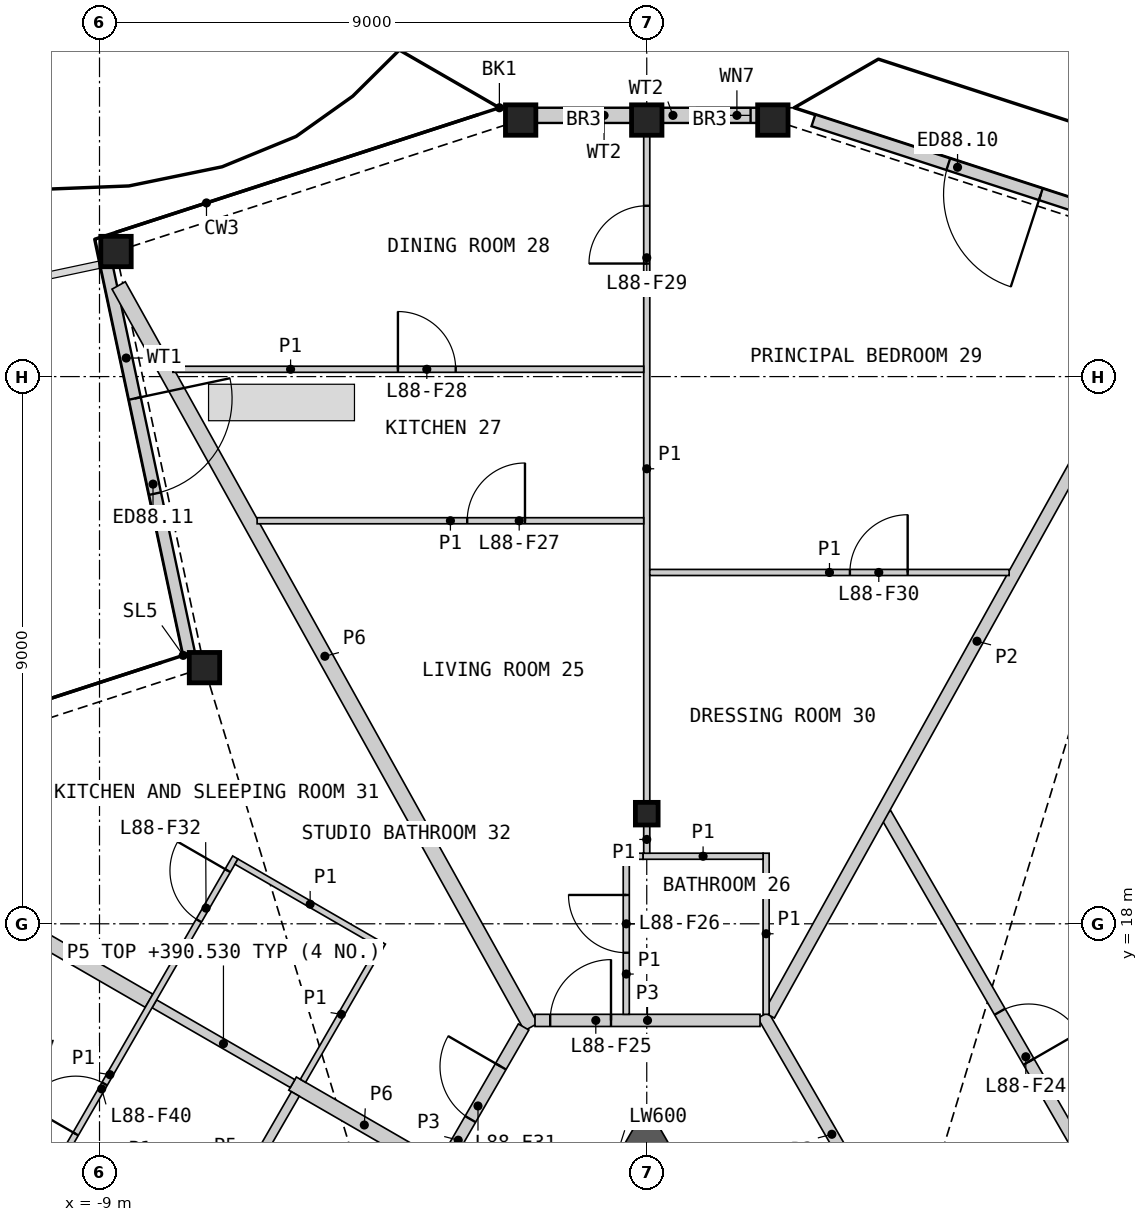
"""IFC4 building model, lengths in metres.
Left out: names, types, materials, properties, quantities, classifications, styles, units other than length and angle.
Written with IfcOpenShell. Run it as: python <this file> out.ifc"""

import sys

from ifc_helpers import new_model, si_unit, direction, frame, frame_2d, origin, origin_2d, place, context, subcontext, project, spatial, polyline, rectangle, hollow_rectangle, i_section, outline, extrude, element, fill, save


model = new_model("IFC4")
c1 = context("Model", 3, precision=1e-05, world=origin(), true_north=direction((0.0, 1.0)))
c2 = subcontext(c1, "Body", "Model", "MODEL_VIEW")
j1 = project(units=[si_unit("LENGTHUNIT", "METRE"), si_unit("PLANEANGLEUNIT", "RADIAN")], contexts=[c1])
p1 = place(None, origin())
s1 = spatial("IfcSite", under=j1, at=p1, CompositionType="ELEMENT")
p2 = place(p1, origin())
s2 = spatial("IfcBuilding", under=s1, at=p2, CompositionType="ELEMENT")
p3 = place(p2, frame((0.0, 0.0, 388.2)))
s3 = spatial("IfcBuildingStorey", under=s2, at=p3, CompositionType="ELEMENT", Elevation=388.2)
for number, where, z_axis, x_axis in (
    (1, (2.074, 31.219, 0.0), (0.0, 0.0, 1.0), (1.0, 0.0, 0.0)),
    (2, (0.0, 31.219, 0.0), (0.0, 0.0, 1.0), (1.0, 0.0, 0.0)),
    (3, (-2.074, 31.219, 0.0), (0.0, 0.0, 1.0), (1.0, 0.0, 0.0)),
    (4, (-8.729, 29.057, 0.0), (0.0, 0.0, 1.0), (1.0, 0.0, 0.0)),
    (5, (-7.274, 22.213, 0.0), (0.0, 0.0, 1.0), (1.0, 0.0, 0.0)),
):
    element("IfcColumn", number, at=place(p3, frame(where, z_axis=z_axis, x_axis=x_axis)), inside=s3, PredefinedType="COLUMN", context=c2, shape_type="SweptSolid", body=[
        extrude(hollow_rectangle(XDim=0.5, YDim=0.5, WallThickness=0.03, at=origin_2d()), origin(), (0.0, 0.0, 1.0), 3.4),
    ])
p4 = place(p3, frame((0.0, 19.811, 0.0), z_axis=(0.0, 0.0, 1.0), x_axis=(1.0, 0.0, 0.0)))
e6 = element("IfcColumn", 6, at=p4, inside=s3, PredefinedType="COLUMN", context=c2, shape_type="SweptSolid", body=[
    extrude(i_section(OverallWidth=0.374, OverallDepth=0.372, WebThickness=0.016, FlangeThickness=0.026, at=origin_2d()), origin(), (0.0, 0.0, 1.0), 3.4),
])
p5 = place(p3, frame((8.699, 29.277, 0.0), z_axis=(0.0, 0.0, 1.0), x_axis=(-0.951048671744, 0.309041136379, 0.0)))
e7 = element("IfcWall", 7, at=p5, inside=s3, PredefinedType="SOLIDWALL", context=c2, shape_type="SweptSolid", body=[
    extrude(rectangle(XDim=6.265, YDim=0.2, at=frame_2d((3.133, 0.0))), origin(), (0.0, 0.0, 1.0), 2.634),
])
p6 = place(p5, frame((2.333, 0.0, 0.0)))
e8 = element("IfcOpeningElement", 8, at=p6, cuts=e7, PredefinedType="OPENING", context=c2, shape_type="SweptSolid", body=[
    extrude(rectangle(XDim=1.6, YDim=2.25, at=frame_2d((0.8, 1.125))), frame((0.0, 0.11, 0.0), z_axis=(0.0, -1.0, 0.0), x_axis=(1.0, 0.0, 0.0)), (0.0, 0.0, 1.0), 0.22),
])
p7 = place(p3, frame((2.058, 31.296, 0.0), z_axis=(0.0, 0.0, 1.0), x_axis=(-1.0, 0.0, 0.0)))
e9 = element("IfcWall", 9, at=p7, inside=s3, PredefinedType="SOLIDWALL", context=c2, shape_type="SweptSolid", body=[
    extrude(rectangle(XDim=1.808, YDim=0.25, at=frame_2d((0.904, 0.0))), origin(), (0.0, 0.0, 1.0), 2.634),
])
p8 = place(p7, frame((0.35, 0.0, 1.8)))
e10 = element("IfcOpeningElement", 10, at=p8, cuts=e9, PredefinedType="OPENING", context=c2, shape_type="SweptSolid", body=[
    extrude(rectangle(XDim=0.9, YDim=0.6, at=frame_2d((0.45, 0.3))), frame((0.0, 0.135, 0.0), z_axis=(0.0, -1.0, 0.0), x_axis=(1.0, 0.0, 0.0)), (0.0, 0.0, 1.0), 0.27),
])
p9 = place(p3, frame((-0.25, 31.296, 0.0), z_axis=(0.0, 0.0, 1.0), x_axis=(-1.0, 0.0, 0.0)))
e11 = element("IfcWall", 11, at=p9, inside=s3, PredefinedType="SOLIDWALL", context=c2, shape_type="SweptSolid", body=[
    extrude(rectangle(XDim=1.808, YDim=0.25, at=frame_2d((0.904, 0.0))), origin(), (0.0, 0.0, 1.0), 2.634),
])
p10 = place(p3, frame((-8.905, 28.922, 0.0), z_axis=(0.0, 0.0, 1.0), x_axis=(0.207917488951, -0.978146368285, 0.0)))
e12 = element("IfcWall", 12, at=p10, inside=s3, PredefinedType="SOLIDWALL", context=c2, shape_type="SweptSolid", body=[
    extrude(rectangle(XDim=6.612, YDim=0.2, at=frame_2d((3.306, 0.0))), origin(), (0.0, 0.0, 1.0), 2.634),
])
p11 = place(p10, frame((2.333, 0.0, 0.0)))
e13 = element("IfcOpeningElement", 13, at=p11, cuts=e12, PredefinedType="OPENING", context=c2, shape_type="SweptSolid", body=[
    extrude(rectangle(XDim=1.6, YDim=2.25, at=frame_2d((0.8, 1.125))), frame((0.0, 0.11, 0.0), z_axis=(0.0, -1.0, 0.0), x_axis=(1.0, 0.0, 0.0)), (0.0, 0.0, 1.0), 0.22),
])
p12 = place(p3, origin())
e14 = element("IfcWall", 14, at=p12, inside=s3, PredefinedType="SHEAR", context=c2, shape_type="SweptSolid", body=[
    extrude(outline(polyline([(-0.52, 14.111), (0.0, 15.011), (0.52, 14.111), (0.0, 13.811), (-0.52, 14.111)])), origin(), (0.0, 0.0, 1.0), 3.1),
])
p13 = place(p3, frame((-8.685, 28.499, 0.0), z_axis=(0.0, 0.0, 1.0), x_axis=(0.486017177904, -0.873949256412, 0.0)))
e15 = element("IfcWall", 15, at=p13, inside=s3, PredefinedType="PARTITIONING", context=c2, shape_type="SweptSolid", body=[
    extrude(rectangle(XDim=13.956, YDim=0.25, at=frame_2d((6.978, 0.0))), origin(), (0.0, 0.0, 1.0), 2.33),
])
p14 = place(p3, frame((-13.669, 19.9, 0.0), z_axis=(0.0, 0.0, 1.0), x_axis=(0.866032778651, -0.499987226139, 0.0)))
e16 = element("IfcWall", 16, at=p14, inside=s3, PredefinedType="PARTITIONING", context=c2, shape_type="SweptSolid", body=[
    extrude(rectangle(XDim=6.332, YDim=0.25, at=frame_2d((3.166, 0.0))), origin(), (0.0, 0.0, 1.0), 2.33),
])
p15 = place(p3, frame((1.913, 16.498, 0.0), z_axis=(0.0, 0.0, 1.0), x_axis=(0.499974648164, -0.866040040179, 0.0)))
e17 = element("IfcWall", 17, at=p15, inside=s3, PredefinedType="PARTITIONING", context=c2, shape_type="SweptSolid", body=[
    extrude(rectangle(XDim=4.525, YDim=0.2, at=frame_2d((2.263, 0.0))), origin(), (0.0, 0.0, 1.0), 3.1),
])
p16 = place(p3, frame((-4.176, 12.579, 0.0), z_axis=(0.0, 0.0, 1.0), x_axis=(0.500004215162, 0.866022970146, 0.0)))
e18 = element("IfcWall", 18, at=p16, inside=s3, PredefinedType="PARTITIONING", context=c2, shape_type="SweptSolid", body=[
    extrude(rectangle(XDim=4.3, YDim=0.2, at=frame_2d((2.15, 0.0))), origin(), (0.0, 0.0, 1.0), 3.1),
])
p17 = place(p16, frame((2.55, 0.0, 0.0)))
e19 = element("IfcOpeningElement", 19, at=p17, cuts=e18, PredefinedType="OPENING", context=c2, shape_type="SweptSolid", body=[
    extrude(rectangle(XDim=1.0, YDim=2.1, at=frame_2d((0.5, 1.05))), frame((0.0, 0.11, 0.0), z_axis=(0.0, -1.0, 0.0), x_axis=(1.0, 0.0, 0.0)), (0.0, 0.0, 1.0), 0.22),
])
p18 = place(p3, frame((-1.838, 16.411, 0.0), z_axis=(0.0, 0.0, 1.0), x_axis=(1.0, 0.0, 0.0)))
e20 = element("IfcWall", 20, at=p18, inside=s3, PredefinedType="PARTITIONING", context=c2, shape_type="SweptSolid", body=[
    extrude(rectangle(XDim=3.701, YDim=0.2, at=frame_2d((1.851, 0.0))), origin(), (0.0, 0.0, 1.0), 3.1),
])
p19 = place(p18, frame((0.25, 0.0, 0.0)))
e21 = element("IfcOpeningElement", 21, at=p19, cuts=e20, PredefinedType="OPENING", context=c2, shape_type="SweptSolid", body=[
    extrude(rectangle(XDim=1.0, YDim=2.1, at=frame_2d((0.5, 1.05))), frame((0.0, 0.11, 0.0), z_axis=(0.0, -1.0, 0.0), x_axis=(1.0, 0.0, 0.0)), (0.0, 0.0, 1.0), 0.22),
])
p20 = place(p3, frame((-5.825, 15.372, 0.0), z_axis=(0.0, 0.0, 1.0), x_axis=(0.866051307416, -0.49995513091, 0.0)))
e22 = element("IfcWall", 22, at=p20, inside=s3, PredefinedType="PARTITIONING", context=c2, shape_type="SweptSolid", body=[
    extrude(rectangle(XDim=2.725, YDim=0.25, at=frame_2d((1.362, 0.0))), origin(), (0.0, 0.0, 1.0), 2.33),
])
p21 = place(p3, frame((3.926, 19.811, 0.0), z_axis=(0.0, 0.0, 1.0), x_axis=(0.500001082559, -0.866024778768, 0.0)))
e23 = element("IfcWall", 23, at=p21, inside=s3, PredefinedType="PARTITIONING", context=c2, shape_type="SweptSolid", body=[
    extrude(rectangle(XDim=15.094, YDim=0.2, at=frame_2d((7.547, 0.0))), origin(), (0.0, 0.0, 1.0), 2.33),
])
p22 = place(p21, frame((3.761, 0.0, 0.0)))
e24 = element("IfcOpeningElement", 24, at=p22, cuts=e23, PredefinedType="OPENING", context=c2, shape_type="SweptSolid", body=[
    extrude(rectangle(XDim=0.95, YDim=2.1, at=frame_2d((0.475, 1.05))), frame((0.0, 0.11, 0.0), z_axis=(0.0, -1.0, 0.0), x_axis=(1.0, 0.0, 0.0)), (0.0, 0.0, 1.0), 0.22),
])
p23 = place(p3, frame((2.012, 16.498, 0.0), z_axis=(0.0, 0.0, 1.0), x_axis=(0.485991996179, 0.873963259897, 0.0)))
e25 = element("IfcWall", 25, at=p23, inside=s3, PredefinedType="PARTITIONING", context=c2, shape_type="SweptSolid", body=[
    extrude(rectangle(XDim=14.073, YDim=0.2, at=frame_2d((7.036, 0.0))), origin(), (0.0, 0.0, 1.0), 2.33),
])
p24 = place(p3, frame((-8.098, 16.684, 0.0), z_axis=(0.0, 0.0, 1.0), x_axis=(0.866036909293, -0.499980071345, 0.0)))
e26 = element("IfcWall", 26, at=p24, inside=s3, PredefinedType="PLUMBINGWALL", context=c2, shape_type="SweptSolid", body=[
    extrude(rectangle(XDim=2.625, YDim=0.15, at=frame_2d((1.312, 0.0))), origin(), (0.0, 0.0, 1.0), 2.33),
])
p25 = place(p3, frame((-7.104, 12.906, 0.0), z_axis=(0.0, 0.0, 1.0), x_axis=(0.499993606316, 0.866029095148, 0.0)))
e27 = element("IfcWall", 27, at=p25, inside=s3, PredefinedType="PLUMBINGWALL", context=c2, shape_type="SweptSolid", body=[
    extrude(rectangle(XDim=2.65, YDim=0.15, at=frame_2d((1.325, 0.0))), origin(), (0.0, 0.0, 1.0), 2.33),
])
p26 = place(p3, frame((0.0, 20.008, 0.0), z_axis=(0.0, 0.0, 1.0), x_axis=(0.0, 1.0, 0.0)))
e28 = element("IfcWall", 28, at=p26, inside=s3, PredefinedType="PARTITIONING", context=c2, shape_type="SweptSolid", body=[
    extrude(rectangle(XDim=10.951, YDim=0.1, at=frame_2d((5.476, 0.0))), origin(), (0.0, 0.0, 1.0), 2.33),
])
p27 = place(p26, frame((8.851, 0.0, 0.0)))
e29 = element("IfcOpeningElement", 29, at=p27, cuts=e28, PredefinedType="OPENING", context=c2, shape_type="SweptSolid", body=[
    extrude(rectangle(XDim=0.95, YDim=2.1, at=frame_2d((0.475, 1.05))), frame((0.0, 0.06, 0.0), z_axis=(0.0, -1.0, 0.0), x_axis=(1.0, 0.0, 0.0)), (0.0, 0.0, 1.0), 0.12),
])
p28 = place(p3, frame((-7.793, 27.12, 0.0), z_axis=(0.0, 0.0, 1.0), x_axis=(1.0, 0.0, 0.0)))
e30 = element("IfcWall", 30, at=p28, inside=s3, PredefinedType="PARTITIONING", context=c2, shape_type="SweptSolid", body=[
    extrude(rectangle(XDim=7.743, YDim=0.1, at=frame_2d((3.872, 0.0))), origin(), (0.0, 0.0, 1.0), 2.33),
])
p29 = place(p28, frame((3.701, 0.0, 0.0)))
e31 = element("IfcOpeningElement", 31, at=p29, cuts=e30, PredefinedType="OPENING", context=c2, shape_type="SweptSolid", body=[
    extrude(rectangle(XDim=0.95, YDim=2.1, at=frame_2d((0.475, 1.05))), frame((0.0, 0.06, 0.0), z_axis=(0.0, -1.0, 0.0), x_axis=(1.0, 0.0, 0.0)), (0.0, 0.0, 1.0), 0.12),
])
p30 = place(p3, frame((-6.408, 24.629, 0.0), z_axis=(0.0, 0.0, 1.0), x_axis=(1.0, 0.0, 0.0)))
e32 = element("IfcWall", 32, at=p30, inside=s3, PredefinedType="PARTITIONING", context=c2, shape_type="SweptSolid", body=[
    extrude(rectangle(XDim=6.358, YDim=0.1, at=frame_2d((3.179, 0.0))), origin(), (0.0, 0.0, 1.0), 2.33),
])
p31 = place(p30, frame((3.455, 0.0, 0.0)))
e33 = element("IfcOpeningElement", 33, at=p31, cuts=e32, PredefinedType="OPENING", context=c2, shape_type="SweptSolid", body=[
    extrude(rectangle(XDim=0.95, YDim=2.1, at=frame_2d((0.475, 1.05))), frame((0.0, 0.06, 0.0), z_axis=(0.0, -1.0, 0.0), x_axis=(1.0, 0.0, 0.0)), (0.0, 0.0, 1.0), 0.12),
])
p32 = place(p3, frame((0.05, 23.778, 0.0), z_axis=(0.0, 0.0, 1.0), x_axis=(1.0, 0.0, 0.0)))
e34 = element("IfcWall", 34, at=p32, inside=s3, PredefinedType="PARTITIONING", context=c2, shape_type="SweptSolid", body=[
    extrude(rectangle(XDim=5.91, YDim=0.1, at=frame_2d((2.955, 0.0))), origin(), (0.0, 0.0, 1.0), 2.33),
])
p33 = place(p32, frame((3.291, 0.0, 0.0)))
e35 = element("IfcOpeningElement", 35, at=p33, cuts=e34, PredefinedType="OPENING", context=c2, shape_type="SweptSolid", body=[
    extrude(rectangle(XDim=0.95, YDim=2.1, at=frame_2d((0.475, 1.05))), frame((0.0, 0.06, 0.0), z_axis=(0.0, -1.0, 0.0), x_axis=(1.0, 0.0, 0.0)), (0.0, 0.0, 1.0), 0.12),
])
p34 = place(p3, frame((-9.517, 14.328, 0.0), z_axis=(0.0, 0.0, 1.0), x_axis=(0.499996545922, 0.866027397988, 0.0)))
e36 = element("IfcWall", 36, at=p34, inside=s3, PredefinedType="PARTITIONING", context=c2, shape_type="SweptSolid", body=[
    extrude(rectangle(XDim=5.5, YDim=0.1, at=frame_2d((2.75, 0.0))), origin(), (0.0, 0.0, 1.0), 2.33),
])
p35 = place(p34, frame((4.3, 0.0, 0.0)))
e37 = element("IfcOpeningElement", 37, at=p35, cuts=e36, PredefinedType="OPENING", context=c2, shape_type="SweptSolid", body=[
    extrude(rectangle(XDim=0.95, YDim=2.1, at=frame_2d((0.475, 1.05))), frame((0.0, 0.06, 0.0), z_axis=(0.0, -1.0, 0.0), x_axis=(1.0, 0.0, 0.0)), (0.0, 0.0, 1.0), 0.12),
])
p36 = place(p34, frame((0.25, 0.0, 0.0)))
e38 = element("IfcOpeningElement", 38, at=p36, cuts=e36, PredefinedType="OPENING", context=c2, shape_type="SweptSolid", body=[
    extrude(rectangle(XDim=0.95, YDim=2.1, at=frame_2d((0.475, 1.05))), frame((0.0, 0.06, 0.0), z_axis=(0.0, -1.0, 0.0), x_axis=(1.0, 0.0, 0.0)), (0.0, 0.0, 1.0), 0.12),
])
p37 = place(p3, frame((-6.748, 19.023, 0.0), z_axis=(0.0, 0.0, 1.0), x_axis=(0.866034573852, -0.49998411664, 0.0)))
e39 = element("IfcWall", 39, at=p37, inside=s3, PredefinedType="PARTITIONING", context=c2, shape_type="SweptSolid", body=[
    extrude(rectangle(XDim=2.8, YDim=0.1, at=frame_2d((1.4, 0.0))), origin(), (0.0, 0.0, 1.0), 2.33),
])
p38 = place(p3, frame((-5.654, 15.418, 0.0), z_axis=(0.0, 0.0, 1.0), x_axis=(0.500048846702, 0.865997200291, 0.0)))
e40 = element("IfcWall", 40, at=p38, inside=s3, PredefinedType="PARTITIONING", context=c2, shape_type="SweptSolid", body=[
    extrude(rectangle(XDim=2.525, YDim=0.1, at=frame_2d((1.263, 0.0))), origin(), (0.0, 0.0, 1.0), 2.33),
])
p39 = place(p3, frame((1.963, 16.511, 0.0), z_axis=(0.0, 0.0, 1.0), x_axis=(0.0, 1.0, 0.0)))
e41 = element("IfcWall", 41, at=p39, inside=s3, PredefinedType="PARTITIONING", context=c2, shape_type="SweptSolid", body=[
    extrude(rectangle(XDim=2.65, YDim=0.1, at=frame_2d((1.325, 0.0))), origin(), (0.0, 0.0, 1.0), 2.33),
])
p40 = place(p3, frame((-0.337, 16.511, 0.0), z_axis=(0.0, 0.0, 1.0), x_axis=(0.0, 1.0, 0.0)))
e42 = element("IfcWall", 42, at=p40, inside=s3, PredefinedType="PARTITIONING", context=c2, shape_type="SweptSolid", body=[
    extrude(rectangle(XDim=2.649, YDim=0.1, at=frame_2d((1.325, 0.0))), origin(), (0.0, 0.0, 1.0), 2.33),
])
p41 = place(p40, frame((1.013, 0.0, 0.0)))
e43 = element("IfcOpeningElement", 43, at=p41, cuts=e42, PredefinedType="OPENING", context=c2, shape_type="SweptSolid", body=[
    extrude(rectangle(XDim=0.95, YDim=2.1, at=frame_2d((0.475, 1.05))), frame((0.0, 0.06, 0.0), z_axis=(0.0, -1.0, 0.0), x_axis=(1.0, 0.0, 0.0)), (0.0, 0.0, 1.0), 0.12),
])
p42 = place(p3, frame((-0.06, 19.111, 0.0), z_axis=(0.0, 0.0, 1.0), x_axis=(1.0, 0.0, 0.0)))
e44 = element("IfcWall", 44, at=p42, inside=s3, PredefinedType="PARTITIONING", context=c2, shape_type="SweptSolid", body=[
    extrude(rectangle(XDim=1.973, YDim=0.1, at=frame_2d((0.987, 0.0))), origin(), (0.0, 0.0, 1.0), 2.33),
])
p43 = place(p3, frame((0.0, 19.161, 0.0), z_axis=(0.0, 0.0, 1.0), x_axis=(0.0, 1.0, 0.0)))
e45 = element("IfcWall", 45, at=p43, inside=s3, PredefinedType="PARTITIONING", context=c2, shape_type="SweptSolid", body=[
    extrude(rectangle(XDim=0.453, YDim=0.1, at=frame_2d((0.227, 0.0))), origin(), (0.0, 0.0, 1.0), 2.33),
])
p44 = place(p3, frame((-0.287, 19.11, 0.0), z_axis=(0.0, 0.0, 1.0), x_axis=(0.999994683407, 0.003260852229, 0.0)))
e46 = element("IfcWall", 46, at=p44, inside=s3, PredefinedType="PARTITIONING", context=c2, shape_type="SweptSolid", body=[
    extrude(rectangle(XDim=0.225, YDim=0.1, at=frame_2d((0.112, 0.0))), origin(), (0.0, 0.0, 1.0), 2.33),
])
p45 = place(p6, origin())
e47 = element("IfcDoor", 47, at=p45, inside=s3, OperationType="DOUBLE_DOOR_SINGLE_SWING", PredefinedType="DOOR", context=c2, shape_type="SweptSolid", body=[
    extrude(rectangle(XDim=1.6, YDim=2.25, at=frame_2d((0.8, 1.125))), frame((0.0, 0.025, 0.0), z_axis=(0.0, -1.0, 0.0), x_axis=(1.0, 0.0, 0.0)), (0.0, 0.0, 1.0), 0.05),
])
fill(e8, e47)
p46 = place(p8, origin())
e48 = element("IfcWindow", 48, at=p46, inside=s3, PartitioningType="SINGLE_PANEL", PredefinedType="WINDOW", context=c2, shape_type="SweptSolid", body=[
    extrude(rectangle(XDim=0.9, YDim=0.6, at=frame_2d((0.45, 0.3))), frame((0.0, 0.03, 0.0), z_axis=(0.0, -1.0, 0.0), x_axis=(1.0, 0.0, 0.0)), (0.0, 0.0, 1.0), 0.06),
])
fill(e10, e48)
p47 = place(p11, origin())
e49 = element("IfcDoor", 49, at=p47, inside=s3, OperationType="DOUBLE_DOOR_SINGLE_SWING", PredefinedType="DOOR", context=c2, shape_type="SweptSolid", body=[
    extrude(rectangle(XDim=1.6, YDim=2.25, at=frame_2d((0.8, 1.125))), frame((0.0, 0.025, 0.0), z_axis=(0.0, -1.0, 0.0), x_axis=(1.0, 0.0, 0.0)), (0.0, 0.0, 1.0), 0.05),
])
fill(e13, e49)
p48 = place(p22, origin())
e50 = element("IfcDoor", 50, at=p48, inside=s3, OperationType="SINGLE_SWING_RIGHT", PredefinedType="DOOR", context=c2, shape_type="SweptSolid", body=[
    extrude(rectangle(XDim=0.95, YDim=2.1, at=frame_2d((0.475, 1.05))), frame((0.0, 0.025, 0.0), z_axis=(0.0, -1.0, 0.0), x_axis=(1.0, 0.0, 0.0)), (0.0, 0.0, 1.0), 0.05),
])
fill(e24, e50)
p49 = place(p19, origin())
e51 = element("IfcDoor", 51, at=p49, inside=s3, OperationType="SINGLE_SWING_RIGHT", PredefinedType="DOOR", context=c2, shape_type="SweptSolid", body=[
    extrude(rectangle(XDim=1.0, YDim=2.1, at=frame_2d((0.5, 1.05))), frame((0.0, 0.025, 0.0), z_axis=(0.0, -1.0, 0.0), x_axis=(1.0, 0.0, 0.0)), (0.0, 0.0, 1.0), 0.05),
])
fill(e21, e51)
p50 = place(p41, origin())
e52 = element("IfcDoor", 52, at=p50, inside=s3, OperationType="SINGLE_SWING_RIGHT", PredefinedType="DOOR", context=c2, shape_type="SweptSolid", body=[
    extrude(rectangle(XDim=0.95, YDim=2.1, at=frame_2d((0.475, 1.05))), frame((0.0, 0.025, 0.0), z_axis=(0.0, -1.0, 0.0), x_axis=(1.0, 0.0, 0.0)), (0.0, 0.0, 1.0), 0.05),
])
fill(e43, e52)
p51 = place(p31, origin())
e53 = element("IfcDoor", 53, at=p51, inside=s3, OperationType="SINGLE_SWING_RIGHT", PredefinedType="DOOR", context=c2, shape_type="SweptSolid", body=[
    extrude(rectangle(XDim=0.95, YDim=2.1, at=frame_2d((0.475, 1.05))), frame((0.0, 0.025, 0.0), z_axis=(0.0, -1.0, 0.0), x_axis=(1.0, 0.0, 0.0)), (0.0, 0.0, 1.0), 0.05),
])
fill(e33, e53)
p52 = place(p29, origin())
e54 = element("IfcDoor", 54, at=p52, inside=s3, OperationType="SINGLE_SWING_LEFT", PredefinedType="DOOR", context=c2, shape_type="SweptSolid", body=[
    extrude(rectangle(XDim=0.95, YDim=2.1, at=frame_2d((0.475, 1.05))), frame((0.0, 0.025, 0.0), z_axis=(0.0, -1.0, 0.0), x_axis=(1.0, 0.0, 0.0)), (0.0, 0.0, 1.0), 0.05),
])
fill(e31, e54)
p53 = place(p27, origin())
e55 = element("IfcDoor", 55, at=p53, inside=s3, OperationType="SINGLE_SWING_LEFT", PredefinedType="DOOR", context=c2, shape_type="SweptSolid", body=[
    extrude(rectangle(XDim=0.95, YDim=2.1, at=frame_2d((0.475, 1.05))), frame((0.0, 0.025, 0.0), z_axis=(0.0, -1.0, 0.0), x_axis=(1.0, 0.0, 0.0)), (0.0, 0.0, 1.0), 0.05),
])
fill(e29, e55)
p54 = place(p33, origin())
e56 = element("IfcDoor", 56, at=p54, inside=s3, OperationType="SINGLE_SWING_RIGHT", PredefinedType="DOOR", context=c2, shape_type="SweptSolid", body=[
    extrude(rectangle(XDim=0.95, YDim=2.1, at=frame_2d((0.475, 1.05))), frame((0.0, 0.025, 0.0), z_axis=(0.0, -1.0, 0.0), x_axis=(1.0, 0.0, 0.0)), (0.0, 0.0, 1.0), 0.05),
])
fill(e35, e56)
p55 = place(p17, origin())
e57 = element("IfcDoor", 57, at=p55, inside=s3, OperationType="SINGLE_SWING_RIGHT", PredefinedType="DOOR", context=c2, shape_type="SweptSolid", body=[
    extrude(rectangle(XDim=1.0, YDim=2.1, at=frame_2d((0.5, 1.05))), frame((0.0, 0.025, 0.0), z_axis=(0.0, -1.0, 0.0), x_axis=(1.0, 0.0, 0.0)), (0.0, 0.0, 1.0), 0.05),
])
fill(e19, e57)
p56 = place(p35, origin())
e58 = element("IfcDoor", 58, at=p56, inside=s3, OperationType="SINGLE_SWING_RIGHT", PredefinedType="DOOR", context=c2, shape_type="SweptSolid", body=[
    extrude(rectangle(XDim=0.95, YDim=2.1, at=frame_2d((0.475, 1.05))), frame((0.0, 0.025, 0.0), z_axis=(0.0, -1.0, 0.0), x_axis=(1.0, 0.0, 0.0)), (0.0, 0.0, 1.0), 0.05),
])
fill(e37, e58)
p57 = place(p36, origin())
e59 = element("IfcDoor", 59, at=p57, inside=s3, OperationType="SINGLE_SWING_LEFT", PredefinedType="DOOR", context=c2, shape_type="SweptSolid", body=[
    extrude(rectangle(XDim=0.95, YDim=2.1, at=frame_2d((0.475, 1.05))), frame((0.0, 0.025, 0.0), z_axis=(0.0, -1.0, 0.0), x_axis=(1.0, 0.0, 0.0)), (0.0, 0.0, 1.0), 0.05),
])
fill(e38, e59)
save(model, sys.argv[1])
